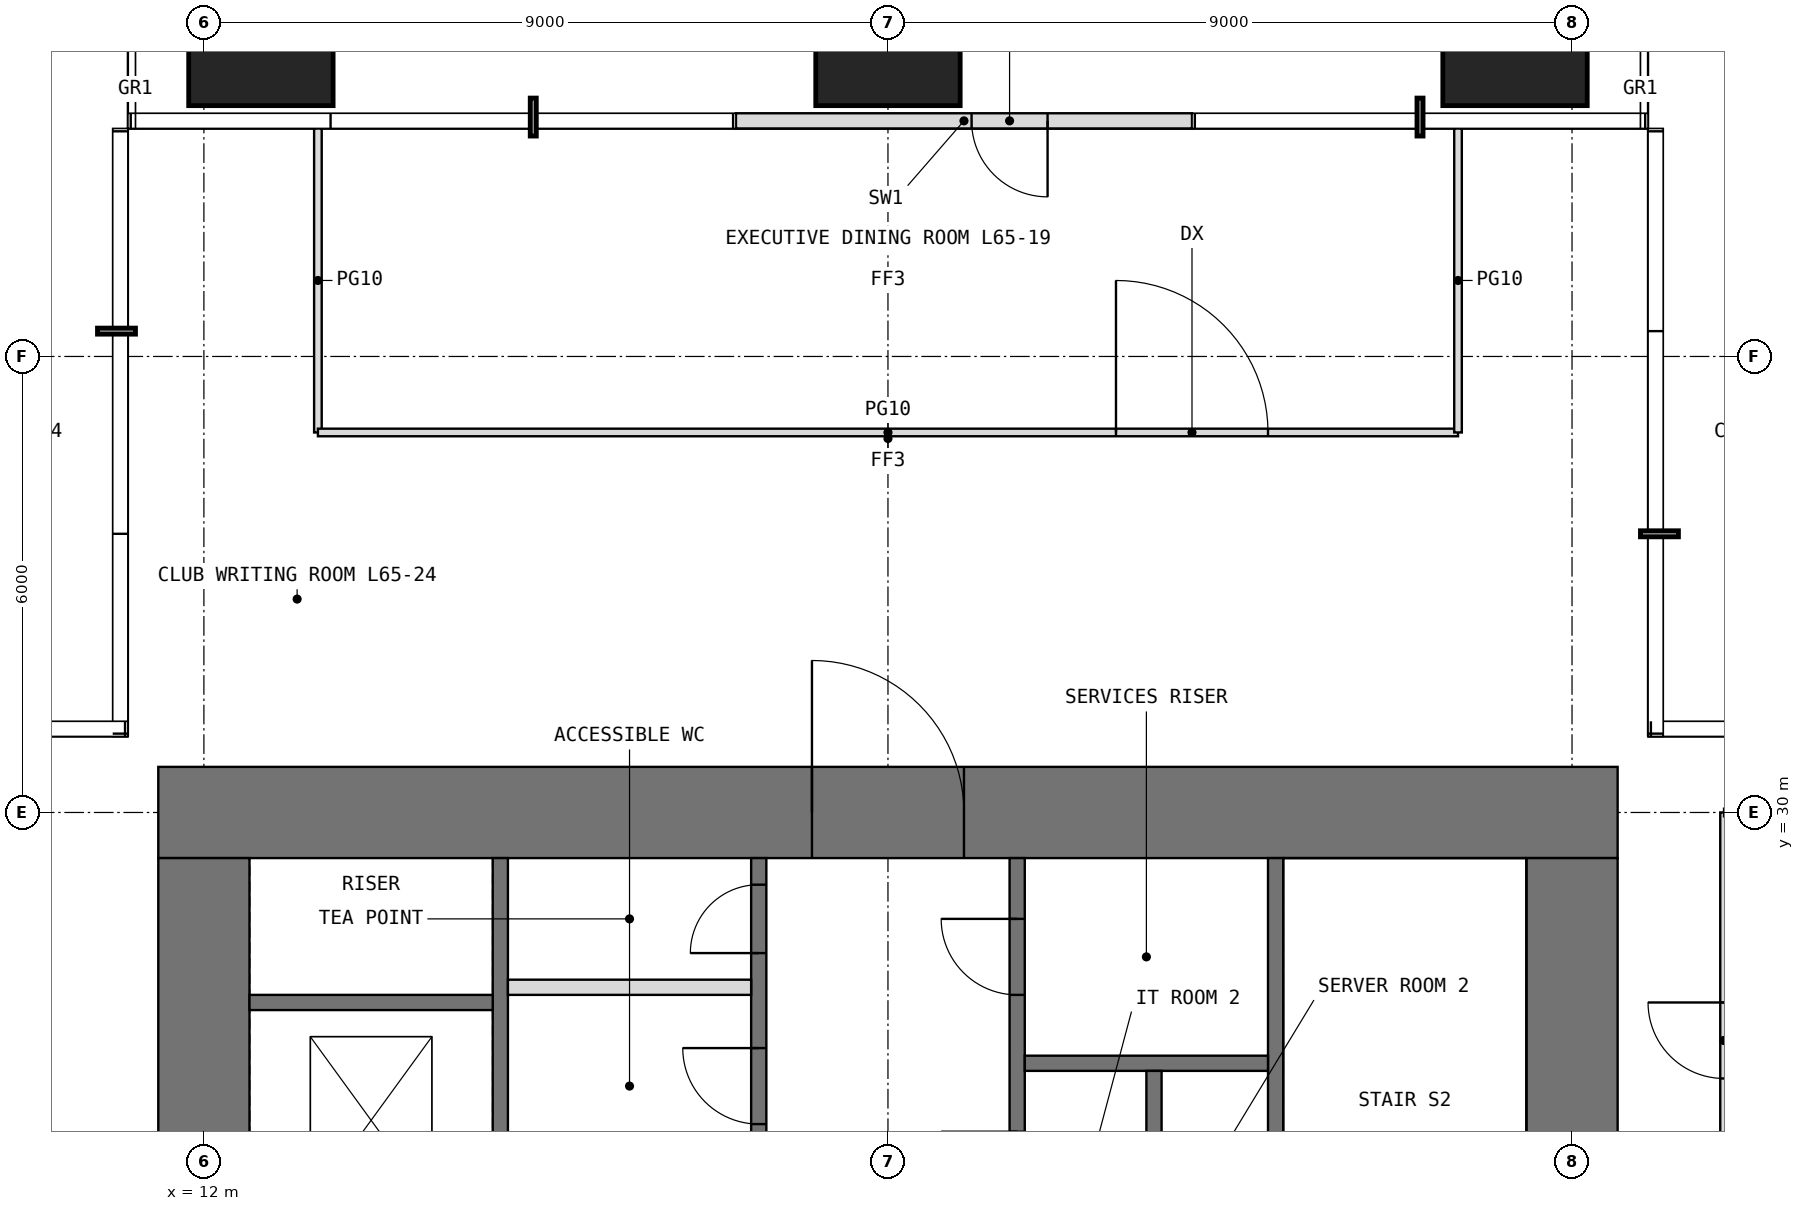
"""IFC4 building model, lengths in metres.
Left out: names, types, materials, properties, quantities, classifications, styles, units other than length and angle.
Written with IfcOpenShell. Run it as: python <this file> out.ifc"""

import sys

from ifc_helpers import new_model, si_unit, direction, frame, frame_2d, origin, origin_2d, place, context, subcontext, project, spatial, rectangle, extrude, element, fill, save


model = new_model("IFC4")
c1 = context("Model", 3, precision=1e-05, world=origin(), true_north=direction((0.0, 1.0)))
c2 = subcontext(c1, "Body", "Model", "MODEL_VIEW")
j1 = project(units=[si_unit("LENGTHUNIT", "METRE"), si_unit("PLANEANGLEUNIT", "RADIAN")], contexts=[c1])
p1 = place(None, origin())
s1 = spatial("IfcSite", under=j1, at=p1, CompositionType="ELEMENT")
p2 = place(p1, origin())
s2 = spatial("IfcBuilding", under=s1, at=p2, CompositionType="ELEMENT")
p3 = place(p2, frame((0.0, 0.0, 273.4)))
s3 = spatial("IfcBuildingStorey", under=s2, at=p3, CompositionType="ELEMENT", Elevation=273.4)
for number, where, z_axis, x_axis in (
    (1, (12.75, 40.25, 0.0), (0.0, 0.0, 1.0), (1.0, 0.0, 0.0)),
    (2, (21.0, 40.25, 0.0), (0.0, 0.0, 1.0), (1.0, 0.0, 0.0)),
    (3, (29.25, 40.25, 0.0), (0.0, 0.0, 1.0), (1.0, 0.0, 0.0)),
):
    element("IfcColumn", number, at=place(p3, frame(where, z_axis=z_axis, x_axis=x_axis)), inside=s3, PredefinedType="COLUMN", context=c2, shape_type="SweptSolid", body=[
        extrude(rectangle(XDim=1.9, YDim=1.9, at=origin_2d()), origin(), (0.0, 0.0, 1.0), 4.5),
    ])
p4 = place(p3, frame((25.0, 39.1, 0.0), z_axis=(0.0, 0.0, 1.0), x_axis=(-1.0, 0.0, 0.0)))
e4 = element("IfcWall", 4, at=p4, inside=s3, PredefinedType="USERDEFINED", context=c2, shape_type="SweptSolid", body=[
    extrude(rectangle(XDim=6.0, YDim=0.2, at=frame_2d((3.0, 0.0))), origin(), (0.0, 0.0, 1.0), 4.2),
])
p5 = place(p4, frame((1.9, 0.0, 0.0)))
e5 = element("IfcOpeningElement", 5, at=p5, cuts=e4, PredefinedType="OPENING", context=c2, shape_type="SweptSolid", body=[
    extrude(rectangle(XDim=1.0, YDim=2.4, at=frame_2d((0.5, 1.2))), frame((0.0, 0.11, 0.0), z_axis=(0.0, -1.0, 0.0), x_axis=(1.0, 0.0, 0.0)), (0.0, 0.0, 1.0), 0.22),
])
p6 = place(p3, frame((11.4, 30.0, -0.05), z_axis=(0.0, 0.0, 1.0), x_axis=(1.0, 0.0, 0.0)))
e6 = element("IfcWall", 6, at=p6, inside=s3, PredefinedType="SHEAR", context=c2, shape_type="SweptSolid", body=[
    extrude(rectangle(XDim=19.2, YDim=1.2, at=frame_2d((9.6, 0.0))), origin(), (0.0, 0.0, 1.0), 4.45),
])
p7 = place(p6, frame((8.6, 0.0, 0.05)))
e7 = element("IfcOpeningElement", 7, at=p7, cuts=e6, PredefinedType="OPENING", context=c2, shape_type="SweptSolid", body=[
    extrude(rectangle(XDim=2.0, YDim=2.2, at=frame_2d((1.0, 1.1))), frame((0.0, 0.61, 0.0), z_axis=(0.0, -1.0, 0.0), x_axis=(1.0, 0.0, 0.0)), (0.0, 0.0, 1.0), 1.22),
])
p8 = place(p3, frame((12.0, 12.6, -0.05), z_axis=(0.0, 0.0, 1.0), x_axis=(0.0, 1.0, 0.0)))
e8 = element("IfcWall", 8, at=p8, inside=s3, PredefinedType="SHEAR", context=c2, shape_type="SweptSolid", body=[
    extrude(rectangle(XDim=16.8, YDim=1.2, at=frame_2d((8.4, 0.0))), origin(), (0.0, 0.0, 1.0), 4.45),
])
p9 = place(p8, frame((9.9, 0.0, 0.05)))
e9 = element("IfcOpeningElement", 9, at=p9, cuts=e8, PredefinedType="OPENING", context=c2, shape_type="SweptSolid", body=[
    extrude(rectangle(XDim=1.0, YDim=2.2, at=frame_2d((0.5, 1.1))), frame((0.0, 0.61, 0.0), z_axis=(0.0, -1.0, 0.0), x_axis=(1.0, 0.0, 0.0)), (0.0, 0.0, 1.0), 1.22),
])
p10 = place(p3, frame((30.0, 12.6, -0.05), z_axis=(0.0, 0.0, 1.0), x_axis=(0.0, 1.0, 0.0)))
e10 = element("IfcWall", 10, at=p10, inside=s3, PredefinedType="SHEAR", context=c2, shape_type="SweptSolid", body=[
    extrude(rectangle(XDim=16.8, YDim=1.2, at=frame_2d((8.4, 0.0))), origin(), (0.0, 0.0, 1.0), 4.45),
])
p11 = place(p10, frame((5.9, 0.0, 0.05)))
e11 = element("IfcOpeningElement", 11, at=p11, cuts=e10, PredefinedType="OPENING", context=c2, shape_type="SweptSolid", body=[
    extrude(rectangle(XDim=1.0, YDim=2.2, at=frame_2d((0.5, 1.1))), frame((0.0, 0.61, 0.0), z_axis=(0.0, -1.0, 0.0), x_axis=(1.0, 0.0, 0.0)), (0.0, 0.0, 1.0), 1.22),
])
p12 = place(p3, frame((15.9, 12.6, -0.05), z_axis=(0.0, 0.0, 1.0), x_axis=(0.0, 1.0, 0.0)))
e12 = element("IfcWall", 12, at=p12, inside=s3, PredefinedType="SHEAR", context=c2, shape_type="SweptSolid", body=[
    extrude(rectangle(XDim=16.8, YDim=0.2, at=frame_2d((8.4, 0.0))), origin(), (0.0, 0.0, 1.0), 4.45),
])
p13 = place(p12, frame((8.9, 0.0, 0.05)))
e13 = element("IfcOpeningElement", 13, at=p13, cuts=e12, PredefinedType="OPENING", context=c2, shape_type="SweptSolid", body=[
    extrude(rectangle(XDim=1.0, YDim=2.2, at=frame_2d((0.5, 1.1))), frame((0.0, 0.11, 0.0), z_axis=(0.0, -1.0, 0.0), x_axis=(1.0, 0.0, 0.0)), (0.0, 0.0, 1.0), 0.22),
])
p14 = place(p3, frame((19.3, 12.6, -0.05), z_axis=(0.0, 0.0, 1.0), x_axis=(0.0, 1.0, 0.0)))
e14 = element("IfcWall", 14, at=p14, inside=s3, PredefinedType="SHEAR", context=c2, shape_type="SweptSolid", body=[
    extrude(rectangle(XDim=16.8, YDim=0.2, at=frame_2d((8.4, 0.0))), origin(), (0.0, 0.0, 1.0), 4.45),
])
p15 = place(p14, frame((8.7, 0.0, 0.05)))
e15 = element("IfcOpeningElement", 15, at=p15, cuts=e14, PredefinedType="OPENING", context=c2, shape_type="SweptSolid", body=[
    extrude(rectangle(XDim=1.0, YDim=2.2, at=frame_2d((0.5, 1.1))), frame((0.0, 0.11, 0.0), z_axis=(0.0, -1.0, 0.0), x_axis=(1.0, 0.0, 0.0)), (0.0, 0.0, 1.0), 0.22),
])
p16 = place(p14, frame((10.85, 0.0, 0.05)))
e16 = element("IfcOpeningElement", 16, at=p16, cuts=e14, PredefinedType="OPENING", context=c2, shape_type="SweptSolid", body=[
    extrude(rectangle(XDim=0.9, YDim=2.2, at=frame_2d((0.45, 1.1))), frame((0.0, 0.11, 0.0), z_axis=(0.0, -1.0, 0.0), x_axis=(1.0, 0.0, 0.0)), (0.0, 0.0, 1.0), 0.22),
])
p17 = place(p14, frame((13.3, 0.0, 0.05)))
e17 = element("IfcOpeningElement", 17, at=p17, cuts=e14, PredefinedType="OPENING", context=c2, shape_type="SweptSolid", body=[
    extrude(rectangle(XDim=1.0, YDim=2.2, at=frame_2d((0.5, 1.1))), frame((0.0, 0.11, 0.0), z_axis=(0.0, -1.0, 0.0), x_axis=(1.0, 0.0, 0.0)), (0.0, 0.0, 1.0), 0.22),
])
p18 = place(p14, frame((15.55, 0.0, 0.05)))
e18 = element("IfcOpeningElement", 18, at=p18, cuts=e14, PredefinedType="OPENING", context=c2, shape_type="SweptSolid", body=[
    extrude(rectangle(XDim=0.9, YDim=2.2, at=frame_2d((0.45, 1.1))), frame((0.0, 0.11, 0.0), z_axis=(0.0, -1.0, 0.0), x_axis=(1.0, 0.0, 0.0)), (0.0, 0.0, 1.0), 0.22),
])
p19 = place(p14, frame((0.75, 0.0, 0.05)))
e19 = element("IfcOpeningElement", 19, at=p19, cuts=e14, PredefinedType="OPENING", context=c2, shape_type="SweptSolid", body=[
    extrude(rectangle(XDim=1.1, YDim=2.2, at=frame_2d((0.55, 1.1))), frame((0.0, 0.11, 0.0), z_axis=(0.0, -1.0, 0.0), x_axis=(1.0, 0.0, 0.0)), (0.0, 0.0, 1.0), 0.22),
])
p20 = place(p14, frame((3.55, 0.0, 0.05)))
e20 = element("IfcOpeningElement", 20, at=p20, cuts=e14, PredefinedType="OPENING", context=c2, shape_type="SweptSolid", body=[
    extrude(rectangle(XDim=1.1, YDim=2.2, at=frame_2d((0.55, 1.1))), frame((0.0, 0.11, 0.0), z_axis=(0.0, -1.0, 0.0), x_axis=(1.0, 0.0, 0.0)), (0.0, 0.0, 1.0), 0.22),
])
p21 = place(p14, frame((6.35, 0.0, 0.05)))
e21 = element("IfcOpeningElement", 21, at=p21, cuts=e14, PredefinedType="OPENING", context=c2, shape_type="SweptSolid", body=[
    extrude(rectangle(XDim=1.1, YDim=2.2, at=frame_2d((0.55, 1.1))), frame((0.0, 0.11, 0.0), z_axis=(0.0, -1.0, 0.0), x_axis=(1.0, 0.0, 0.0)), (0.0, 0.0, 1.0), 0.22),
])
p22 = place(p3, frame((22.7, 12.6, -0.05), z_axis=(0.0, 0.0, 1.0), x_axis=(0.0, 1.0, 0.0)))
e22 = element("IfcWall", 22, at=p22, inside=s3, PredefinedType="SHEAR", context=c2, shape_type="SweptSolid", body=[
    extrude(rectangle(XDim=16.8, YDim=0.2, at=frame_2d((8.4, 0.0))), origin(), (0.0, 0.0, 1.0), 4.45),
])
p23 = place(p22, frame((7.1, 0.0, 0.05)))
e23 = element("IfcOpeningElement", 23, at=p23, cuts=e22, PredefinedType="OPENING", context=c2, shape_type="SweptSolid", body=[
    extrude(rectangle(XDim=1.0, YDim=2.2, at=frame_2d((0.5, 1.1))), frame((0.0, 0.11, 0.0), z_axis=(0.0, -1.0, 0.0), x_axis=(1.0, 0.0, 0.0)), (0.0, 0.0, 1.0), 0.22),
])
p24 = place(p22, frame((1.55, 0.0, 0.05)))
e24 = element("IfcOpeningElement", 24, at=p24, cuts=e22, PredefinedType="OPENING", context=c2, shape_type="SweptSolid", body=[
    extrude(rectangle(XDim=0.9, YDim=2.2, at=frame_2d((0.45, 1.1))), frame((0.0, 0.11, 0.0), z_axis=(0.0, -1.0, 0.0), x_axis=(1.0, 0.0, 0.0)), (0.0, 0.0, 1.0), 0.22),
])
p25 = place(p22, frame((4.95, 0.0, 0.05)))
e25 = element("IfcOpeningElement", 25, at=p25, cuts=e22, PredefinedType="OPENING", context=c2, shape_type="SweptSolid", body=[
    extrude(rectangle(XDim=0.9, YDim=2.2, at=frame_2d((0.45, 1.1))), frame((0.0, 0.11, 0.0), z_axis=(0.0, -1.0, 0.0), x_axis=(1.0, 0.0, 0.0)), (0.0, 0.0, 1.0), 0.22),
])
p26 = place(p22, frame((9.4, 0.0, 0.05)))
e26 = element("IfcOpeningElement", 26, at=p26, cuts=e22, PredefinedType="OPENING", context=c2, shape_type="SweptSolid", body=[
    extrude(rectangle(XDim=1.0, YDim=2.2, at=frame_2d((0.5, 1.1))), frame((0.0, 0.11, 0.0), z_axis=(0.0, -1.0, 0.0), x_axis=(1.0, 0.0, 0.0)), (0.0, 0.0, 1.0), 0.22),
])
p27 = place(p22, frame((12.2, 0.0, 0.05)))
e27 = element("IfcOpeningElement", 27, at=p27, cuts=e22, PredefinedType="OPENING", context=c2, shape_type="SweptSolid", body=[
    extrude(rectangle(XDim=1.0, YDim=2.2, at=frame_2d((0.5, 1.1))), frame((0.0, 0.11, 0.0), z_axis=(0.0, -1.0, 0.0), x_axis=(1.0, 0.0, 0.0)), (0.0, 0.0, 1.0), 0.22),
])
p28 = place(p22, frame((15.0, 0.0, 0.05)))
e28 = element("IfcOpeningElement", 28, at=p28, cuts=e22, PredefinedType="OPENING", context=c2, shape_type="SweptSolid", body=[
    extrude(rectangle(XDim=1.0, YDim=2.2, at=frame_2d((0.5, 1.1))), frame((0.0, 0.11, 0.0), z_axis=(0.0, -1.0, 0.0), x_axis=(1.0, 0.0, 0.0)), (0.0, 0.0, 1.0), 0.22),
])
p29 = place(p3, frame((26.1, 12.6, -0.05), z_axis=(0.0, 0.0, 1.0), x_axis=(0.0, 1.0, 0.0)))
e29 = element("IfcWall", 29, at=p29, inside=s3, PredefinedType="SHEAR", context=c2, shape_type="SweptSolid", body=[
    extrude(rectangle(XDim=16.8, YDim=0.2, at=frame_2d((8.4, 0.0))), origin(), (0.0, 0.0, 1.0), 4.45),
])
p30 = place(p29, frame((6.9, 0.0, 0.05)))
e30 = element("IfcOpeningElement", 30, at=p30, cuts=e29, PredefinedType="OPENING", context=c2, shape_type="SweptSolid", body=[
    extrude(rectangle(XDim=1.0, YDim=2.2, at=frame_2d((0.5, 1.1))), frame((0.0, 0.11, 0.0), z_axis=(0.0, -1.0, 0.0), x_axis=(1.0, 0.0, 0.0)), (0.0, 0.0, 1.0), 0.22),
])
p31 = place(p3, frame((12.6, 27.5, -0.05), z_axis=(0.0, 0.0, 1.0), x_axis=(1.0, 0.0, 0.0)))
e31 = element("IfcWall", 31, at=p31, inside=s3, PredefinedType="SHEAR", context=c2, shape_type="SweptSolid", body=[
    extrude(rectangle(XDim=3.2, YDim=0.2, at=frame_2d((1.6, 0.0))), origin(), (0.0, 0.0, 1.0), 4.45),
])
p32 = place(p3, frame((16.0, 27.7, 0.0), z_axis=(0.0, 0.0, 1.0), x_axis=(1.0, 0.0, 0.0)))
e32 = element("IfcWall", 32, at=p32, inside=s3, PredefinedType="PARTITIONING", context=c2, shape_type="SweptSolid", body=[
    extrude(rectangle(XDim=3.2, YDim=0.2, at=frame_2d((1.6, 0.0))), origin(), (0.0, 0.0, 1.0), 4.2),
])
p33 = place(p3, frame((22.8, 26.7, -0.05), z_axis=(0.0, 0.0, 1.0), x_axis=(1.0, 0.0, 0.0)))
e33 = element("IfcWall", 33, at=p33, inside=s3, PredefinedType="SHEAR", context=c2, shape_type="SweptSolid", body=[
    extrude(rectangle(XDim=3.2, YDim=0.2, at=frame_2d((1.6, 0.0))), origin(), (0.0, 0.0, 1.0), 4.45),
])
p34 = place(p3, frame((24.5, 24.0, -0.05), z_axis=(0.0, 0.0, 1.0), x_axis=(0.0, 1.0, 0.0)))
e34 = element("IfcWall", 34, at=p34, inside=s3, PredefinedType="SHEAR", context=c2, shape_type="SweptSolid", body=[
    extrude(rectangle(XDim=2.6, YDim=0.2, at=frame_2d((1.3, 0.0))), origin(), (0.0, 0.0, 1.0), 4.45),
])
p35 = place(p34, frame((0.85, 0.0, 0.05)))
e35 = element("IfcOpeningElement", 35, at=p35, cuts=e34, PredefinedType="OPENING", context=c2, shape_type="SweptSolid", body=[
    extrude(rectangle(XDim=0.9, YDim=2.2, at=frame_2d((0.45, 1.1))), frame((0.0, 0.11, 0.0), z_axis=(0.0, -1.0, 0.0), x_axis=(1.0, 0.0, 0.0)), (0.0, 0.0, 1.0), 0.22),
])
p36 = place(p3, frame((13.5, 35.0, 0.0), z_axis=(0.0, 0.0, 1.0), x_axis=(0.0, 1.0, 0.0)))
e36 = element("IfcWall", 36, at=p36, inside=s3, PredefinedType="PARTITIONING", context=c2, shape_type="SweptSolid", body=[
    extrude(rectangle(XDim=4.0, YDim=0.1, at=frame_2d((2.0, 0.0))), origin(), (0.0, 0.0, 1.0), 4.2),
])
p37 = place(p3, frame((13.5, 35.0, 0.0), z_axis=(0.0, 0.0, 1.0), x_axis=(1.0, 0.0, 0.0)))
e37 = element("IfcWall", 37, at=p37, inside=s3, PredefinedType="PARTITIONING", context=c2, shape_type="SweptSolid", body=[
    extrude(rectangle(XDim=15.0, YDim=0.1, at=frame_2d((7.5, 0.0))), origin(), (0.0, 0.0, 1.0), 4.2),
])
p38 = place(p37, frame((10.5, 0.0, 0.0)))
e38 = element("IfcOpeningElement", 38, at=p38, cuts=e37, PredefinedType="OPENING", context=c2, shape_type="SweptSolid", body=[
    extrude(rectangle(XDim=2.0, YDim=2.4, at=frame_2d((1.0, 1.2))), frame((0.0, 0.06, 0.0), z_axis=(0.0, -1.0, 0.0), x_axis=(1.0, 0.0, 0.0)), (0.0, 0.0, 1.0), 0.12),
])
p39 = place(p3, frame((28.5, 35.0, 0.0), z_axis=(0.0, 0.0, 1.0), x_axis=(0.0, 1.0, 0.0)))
e39 = element("IfcWall", 39, at=p39, inside=s3, PredefinedType="PARTITIONING", context=c2, shape_type="SweptSolid", body=[
    extrude(rectangle(XDim=4.0, YDim=0.1, at=frame_2d((2.0, 0.0))), origin(), (0.0, 0.0, 1.0), 4.2),
])
p40 = place(p3, frame((32.0, 24.0, 0.0), z_axis=(0.0, 0.0, 1.0), x_axis=(0.0, 1.0, 0.0)))
e40 = element("IfcWall", 40, at=p40, inside=s3, PredefinedType="PARTITIONING", context=c2, shape_type="SweptSolid", body=[
    extrude(rectangle(XDim=6.0, YDim=0.1, at=frame_2d((3.0, 0.0))), origin(), (0.0, 0.0, 1.0), 4.2),
])
p41 = place(p40, frame((2.5, 0.0, 0.0)))
e41 = element("IfcOpeningElement", 41, at=p41, cuts=e40, PredefinedType="OPENING", context=c2, shape_type="SweptSolid", body=[
    extrude(rectangle(XDim=1.0, YDim=2.2, at=frame_2d((0.5, 1.1))), frame((0.0, 0.06, 0.0), z_axis=(0.0, -1.0, 0.0), x_axis=(1.0, 0.0, 0.0)), (0.0, 0.0, 1.0), 0.12),
])
p42 = place(p5, origin())
e42 = element("IfcDoor", 42, at=p42, inside=s3, OperationType="SINGLE_SWING_LEFT", PredefinedType="DOOR", context=c2, shape_type="SweptSolid", body=[
    extrude(rectangle(XDim=1.0, YDim=2.4, at=frame_2d((0.5, 1.2))), frame((0.0, 0.025, 0.0), z_axis=(0.0, -1.0, 0.0), x_axis=(1.0, 0.0, 0.0)), (0.0, 0.0, 1.0), 0.05),
])
fill(e5, e42)
p43 = place(p7, origin())
e43 = element("IfcDoor", 43, at=p43, inside=s3, OperationType="DOUBLE_DOOR_SINGLE_SWING", PredefinedType="DOOR", context=c2, shape_type="SweptSolid", body=[
    extrude(rectangle(XDim=2.0, YDim=2.2, at=frame_2d((1.0, 1.1))), frame((0.0, 0.025, 0.0), z_axis=(0.0, -1.0, 0.0), x_axis=(1.0, 0.0, 0.0)), (0.0, 0.0, 1.0), 0.05),
])
fill(e7, e43)
p44 = place(p17, origin())
e44 = element("IfcDoor", 44, at=p44, inside=s3, OperationType="SINGLE_SWING_RIGHT", PredefinedType="DOOR", context=c2, shape_type="SweptSolid", body=[
    extrude(rectangle(XDim=1.0, YDim=2.2, at=frame_2d((0.5, 1.1))), frame((0.0, 0.025, 0.0), z_axis=(0.0, -1.0, 0.0), x_axis=(1.0, 0.0, 0.0)), (0.0, 0.0, 1.0), 0.05),
])
fill(e17, e44)
p45 = place(p18, origin())
e45 = element("IfcDoor", 45, at=p45, inside=s3, OperationType="SINGLE_SWING_LEFT", PredefinedType="DOOR", context=c2, shape_type="SweptSolid", body=[
    extrude(rectangle(XDim=0.9, YDim=2.2, at=frame_2d((0.45, 1.1))), frame((0.0, 0.025, 0.0), z_axis=(0.0, -1.0, 0.0), x_axis=(1.0, 0.0, 0.0)), (0.0, 0.0, 1.0), 0.05),
])
fill(e18, e45)
p46 = place(p28, origin())
e46 = element("IfcDoor", 46, at=p46, inside=s3, OperationType="SINGLE_SWING_RIGHT", PredefinedType="DOOR", context=c2, shape_type="SweptSolid", body=[
    extrude(rectangle(XDim=1.0, YDim=2.2, at=frame_2d((0.5, 1.1))), frame((0.0, 0.025, 0.0), z_axis=(0.0, -1.0, 0.0), x_axis=(1.0, 0.0, 0.0)), (0.0, 0.0, 1.0), 0.05),
])
fill(e28, e46)
p47 = place(p38, origin())
e47 = element("IfcDoor", 47, at=p47, inside=s3, OperationType="DOUBLE_DOOR_SINGLE_SWING", PredefinedType="DOOR", context=c2, shape_type="SweptSolid", body=[
    extrude(rectangle(XDim=2.0, YDim=2.4, at=frame_2d((1.0, 1.2))), frame((0.0, 0.025, 0.0), z_axis=(0.0, -1.0, 0.0), x_axis=(1.0, 0.0, 0.0)), (0.0, 0.0, 1.0), 0.05),
])
fill(e38, e47)
p48 = place(p41, origin())
e48 = element("IfcDoor", 48, at=p48, inside=s3, OperationType="SINGLE_SWING_RIGHT", PredefinedType="DOOR", context=c2, shape_type="SweptSolid", body=[
    extrude(rectangle(XDim=1.0, YDim=2.2, at=frame_2d((0.5, 1.1))), frame((0.0, 0.025, 0.0), z_axis=(0.0, -1.0, 0.0), x_axis=(1.0, 0.0, 0.0)), (0.0, 0.0, 1.0), 0.05),
])
fill(e41, e48)
save(model, sys.argv[1])
